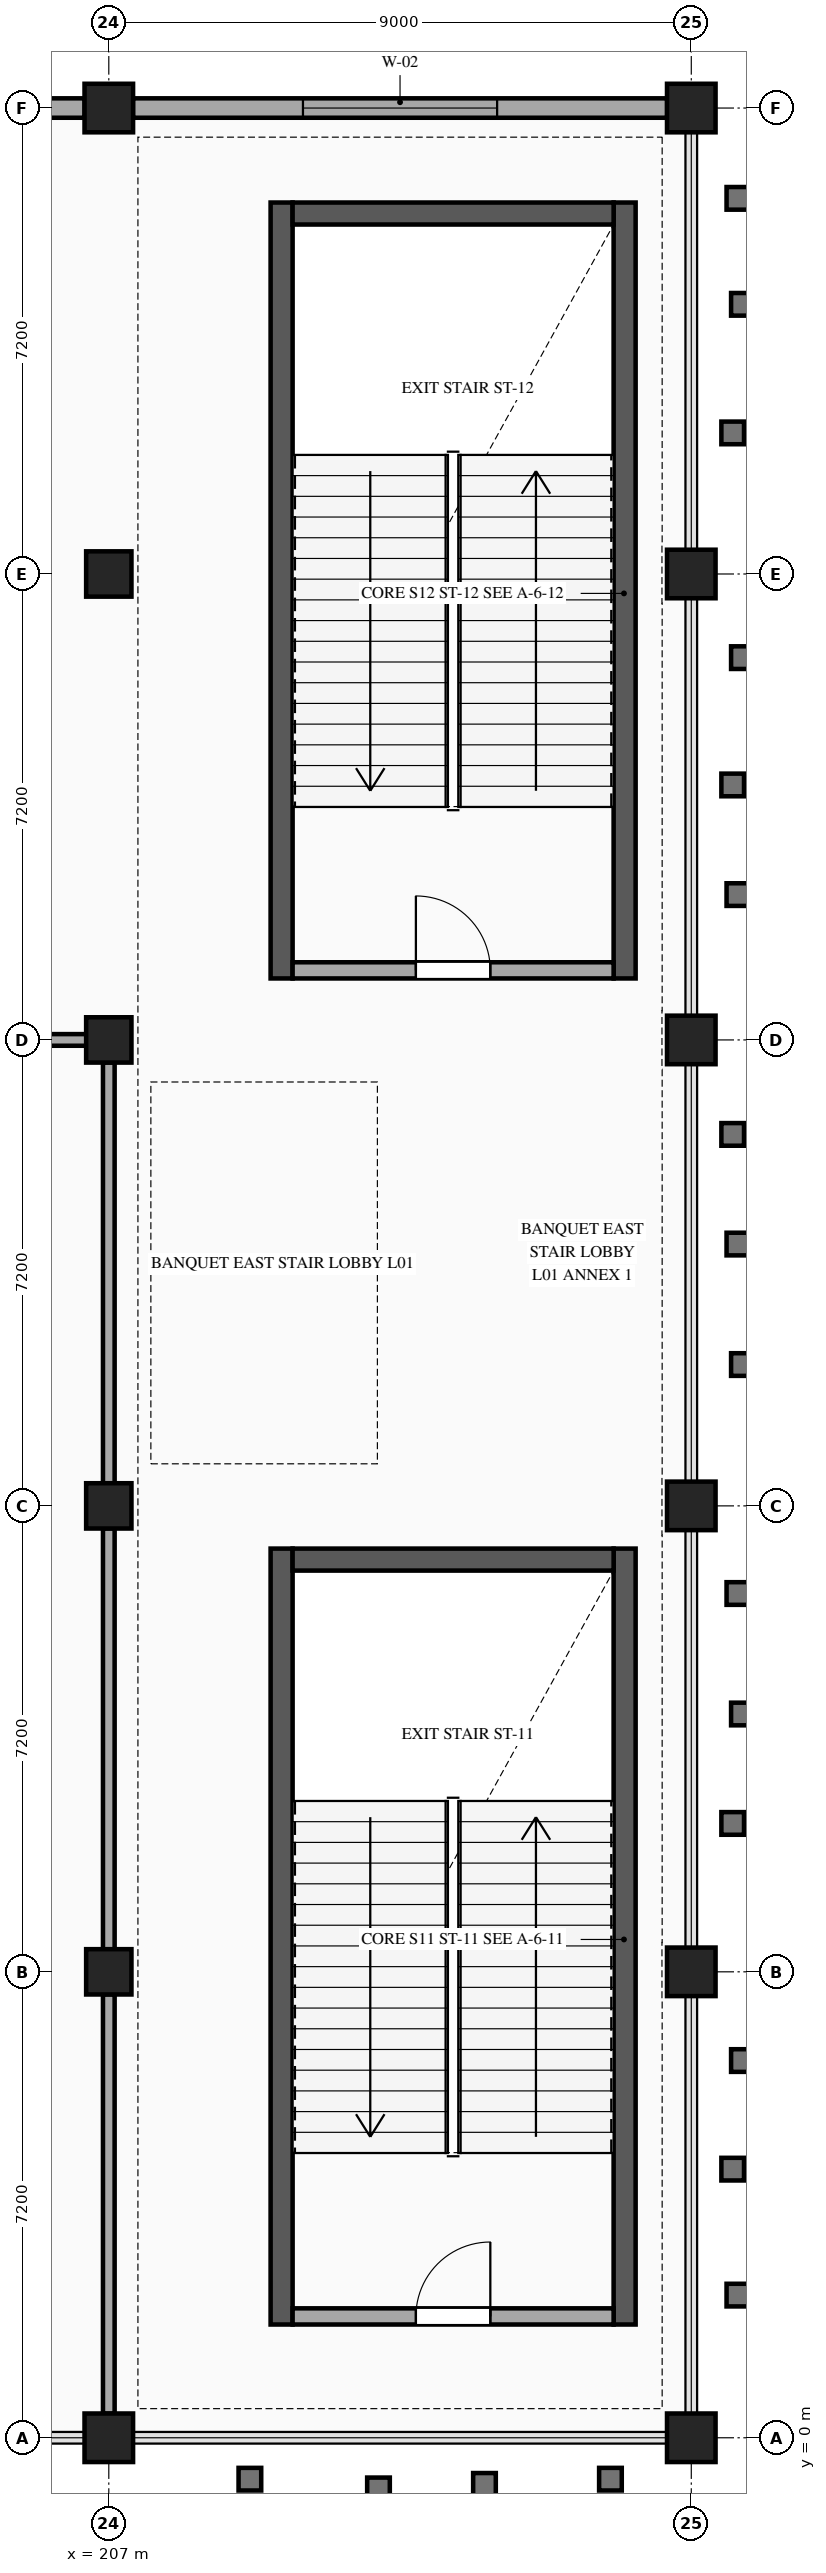
"""IFC4 building model, lengths in metres.
Left out: names, types, materials, properties, quantities, classifications, styles, units other than length and angle.
Written with IfcOpenShell. Run it as: python <this file> out.ifc"""

import sys

from ifc_helpers import new_model, si_unit, direction, frame, frame_2d, origin, origin_2d, place, context, subcontext, project, spatial, rectangle, extrude, element, fill, save


model = new_model("IFC4")
c1 = context("Model", 3, precision=1e-05, world=origin(), true_north=direction((0.0, 1.0)))
c2 = subcontext(c1, "Body", "Model", "MODEL_VIEW")
j1 = project(units=[si_unit("LENGTHUNIT", "METRE"), si_unit("PLANEANGLEUNIT", "RADIAN")], contexts=[c1])
p1 = place(None, origin())
s1 = spatial("IfcSite", under=j1, at=p1, CompositionType="ELEMENT")
p2 = place(p1, origin())
s2 = spatial("IfcBuilding", under=s1, at=p2, CompositionType="ELEMENT")
p3 = place(p2, frame((0.0, 0.0, 5.4)))
s3 = spatial("IfcBuildingStorey", under=s2, at=p3, CompositionType="ELEMENT", Elevation=5.4)
p4 = place(p3, frame((207.0, 0.0, 0.0), z_axis=(0.0, 0.0, 1.0), x_axis=(1.0, 0.0, 0.0)))
e1 = element("IfcColumn", 1, at=p4, inside=s3, PredefinedType="COLUMN", context=c2, shape_type="SweptSolid", body=[
    extrude(rectangle(XDim=0.75, YDim=0.75, at=origin_2d()), origin(), (0.0, 0.0, 1.0), 5.4),
])
for number, where, z_axis, x_axis in (
    (2, (207.0, 7.2, 0.0), (0.0, 0.0, 1.0), (1.0, 0.0, 0.0)),
    (3, (207.0, 14.4, 0.0), (0.0, 0.0, 1.0), (1.0, 0.0, 0.0)),
    (4, (207.0, 21.6, 0.0), (0.0, 0.0, 1.0), (1.0, 0.0, 0.0)),
    (5, (207.0, 28.8, 0.0), (0.0, 0.0, 1.0), (1.0, 0.0, 0.0)),
):
    element("IfcColumn", number, at=place(p3, frame(where, z_axis=z_axis, x_axis=x_axis)), inside=s3, PredefinedType="COLUMN", context=c2, shape_type="SweptSolid", body=[
        extrude(rectangle(XDim=0.7, YDim=0.7, at=origin_2d()), origin(), (0.0, 0.0, 1.0), 5.4),
    ])
for number, where, z_axis, x_axis in (
    (6, (207.0, 36.0, 0.0), (0.0, 0.0, 1.0), (1.0, 0.0, 0.0)),
    (7, (216.0, 0.0, 0.0), (0.0, 0.0, 1.0), (1.0, 0.0, 0.0)),
    (8, (216.0, 7.2, 0.0), (0.0, 0.0, 1.0), (1.0, 0.0, 0.0)),
    (9, (216.0, 14.4, 0.0), (0.0, 0.0, 1.0), (1.0, 0.0, 0.0)),
    (10, (216.0, 21.6, 0.0), (0.0, 0.0, 1.0), (1.0, 0.0, 0.0)),
    (11, (216.0, 28.8, 0.0), (0.0, 0.0, 1.0), (1.0, 0.0, 0.0)),
    (12, (216.0, 36.0, 0.0), (0.0, 0.0, 1.0), (1.0, 0.0, 0.0)),
):
    element("IfcColumn", number, at=place(p3, frame(where, z_axis=z_axis, x_axis=x_axis)), inside=s3, PredefinedType="COLUMN", context=c2, shape_type="SweptSolid", body=[
        extrude(rectangle(XDim=0.75, YDim=0.75, at=origin_2d()), origin(), (0.0, 0.0, 1.0), 5.4),
    ])
for number, where, z_axis, x_axis in (
    (13, (209.67, 1.75, 0.0), (0.0, 0.0, 1.0), (0.0, 1.0, 0.0)),
    (14, (214.97, 13.74, 0.0), (0.0, 0.0, 1.0), (0.0, -1.0, 0.0)),
):
    element("IfcWall", number, at=place(p3, frame(where, z_axis=z_axis, x_axis=x_axis)), inside=s3, PredefinedType="SHEAR", context=c2, shape_type="SweptSolid", body=[
        extrude(rectangle(XDim=11.99, YDim=0.34, at=frame_2d((5.995, 0.0))), origin(), (0.0, 0.0, 1.0), 5.12),
    ])
p5 = place(p3, frame((209.84, 13.57, 0.0), z_axis=(0.0, 0.0, 1.0), x_axis=(1.0, 0.0, 0.0)))
e15 = element("IfcWall", 15, at=p5, inside=s3, PredefinedType="SHEAR", context=c2, shape_type="SweptSolid", body=[
    extrude(rectangle(XDim=4.96, YDim=0.34, at=frame_2d((2.48, 0.0))), origin(), (0.0, 0.0, 1.0), 5.12),
])
for number, where, z_axis, x_axis in (
    (16, (209.67, 22.55, 0.0), (0.0, 0.0, 1.0), (0.0, 1.0, 0.0)),
    (17, (214.97, 34.54, 0.0), (0.0, 0.0, 1.0), (0.0, -1.0, 0.0)),
):
    element("IfcWall", number, at=place(p3, frame(where, z_axis=z_axis, x_axis=x_axis)), inside=s3, PredefinedType="SHEAR", context=c2, shape_type="SweptSolid", body=[
        extrude(rectangle(XDim=11.99, YDim=0.34, at=frame_2d((5.995, 0.0))), origin(), (0.0, 0.0, 1.0), 5.12),
    ])
p6 = place(p3, frame((209.84, 34.37, 0.0), z_axis=(0.0, 0.0, 1.0), x_axis=(1.0, 0.0, 0.0)))
e18 = element("IfcWall", 18, at=p6, inside=s3, PredefinedType="SHEAR", context=c2, shape_type="SweptSolid", body=[
    extrude(rectangle(XDim=4.96, YDim=0.34, at=frame_2d((2.48, 0.0))), origin(), (0.0, 0.0, 1.0), 5.12),
])
p7 = place(p3, frame((198.373, 36.0, 0.0), z_axis=(0.0, 0.0, 1.0), x_axis=(1.0, 0.0, 0.0)))
e19 = element("IfcWall", 19, at=p7, inside=s3, PredefinedType="STANDARD", context=c2, shape_type="SweptSolid", body=[
    extrude(rectangle(XDim=8.254, YDim=0.3, at=frame_2d((4.127, 0.0))), origin(), (0.0, 0.0, 1.0), 4.764),
])
p8 = place(p7, frame((2.327, 0.0, 0.9)))
e20 = element("IfcOpeningElement", 20, at=p8, cuts=e19, PredefinedType="OPENING", context=c2, shape_type="SweptSolid", body=[
    extrude(rectangle(XDim=3.6, YDim=2.1, at=frame_2d((1.8, 1.05))), frame((0.0, 0.16, 0.0), z_axis=(0.0, -1.0, 0.0), x_axis=(1.0, 0.0, 0.0)), (0.0, 0.0, 1.0), 0.32),
])
p9 = place(p3, frame((207.373, 36.0, 0.0), z_axis=(0.0, 0.0, 1.0), x_axis=(1.0, 0.0, 0.0)))
e21 = element("IfcWall", 21, at=p9, inside=s3, PredefinedType="STANDARD", context=c2, shape_type="SweptSolid", body=[
    extrude(rectangle(XDim=8.254, YDim=0.3, at=frame_2d((4.127, 0.0))), origin(), (0.0, 0.0, 1.0), 4.764),
])
p10 = place(p9, frame((2.627, 0.0, 0.9)))
e22 = element("IfcOpeningElement", 22, at=p10, cuts=e21, PredefinedType="OPENING", context=c2, shape_type="SweptSolid", body=[
    extrude(rectangle(XDim=3.0, YDim=2.1, at=frame_2d((1.5, 1.05))), frame((0.0, 0.16, 0.0), z_axis=(0.0, -1.0, 0.0), x_axis=(1.0, 0.0, 0.0)), (0.0, 0.0, 1.0), 0.32),
])
p11 = place(p3, frame((209.84, 1.875, 0.0), z_axis=(0.0, 0.0, 1.0), x_axis=(1.0, 0.0, 0.0)))
e23 = element("IfcWall", 23, at=p11, inside=s3, PredefinedType="STANDARD", context=c2, shape_type="SweptSolid", body=[
    extrude(rectangle(XDim=4.96, YDim=0.25, at=frame_2d((2.48, 0.0))), origin(), (0.0, 0.0, 1.0), 5.12),
])
p12 = place(p11, frame((1.905, 0.0, 0.0)))
e24 = element("IfcOpeningElement", 24, at=p12, cuts=e23, PredefinedType="OPENING", context=c2, shape_type="SweptSolid", body=[
    extrude(rectangle(XDim=1.15, YDim=2.2, at=frame_2d((0.575, 1.1))), frame((0.0, 0.135, 0.0), z_axis=(0.0, -1.0, 0.0), x_axis=(1.0, 0.0, 0.0)), (0.0, 0.0, 1.0), 0.27),
])
p13 = place(p3, frame((209.84, 22.675, 0.0), z_axis=(0.0, 0.0, 1.0), x_axis=(1.0, 0.0, 0.0)))
e25 = element("IfcWall", 25, at=p13, inside=s3, PredefinedType="STANDARD", context=c2, shape_type="SweptSolid", body=[
    extrude(rectangle(XDim=4.96, YDim=0.25, at=frame_2d((2.48, 0.0))), origin(), (0.0, 0.0, 1.0), 5.12),
])
p14 = place(p13, frame((1.905, 0.0, 0.0)))
e26 = element("IfcOpeningElement", 26, at=p14, cuts=e25, PredefinedType="OPENING", context=c2, shape_type="SweptSolid", body=[
    extrude(rectangle(XDim=1.15, YDim=2.2, at=frame_2d((0.575, 1.1))), frame((0.0, 0.135, 0.0), z_axis=(0.0, -1.0, 0.0), x_axis=(1.0, 0.0, 0.0)), (0.0, 0.0, 1.0), 0.27),
])
p15 = place(p3, frame((198.348, 21.6, 0.0), z_axis=(0.0, 0.0, 1.0), x_axis=(1.0, 0.0, 0.0)))
e27 = element("IfcWall", 27, at=p15, inside=s3, PredefinedType="PARTITIONING", context=c2, shape_type="SweptSolid", body=[
    extrude(rectangle(XDim=8.304, YDim=0.18, at=frame_2d((4.152, 0.0))), origin(), (0.0, 0.0, 1.0), 4.264),
])
p16 = place(p3, frame((207.0, 0.373, 0.0), z_axis=(0.0, 0.0, 1.0), x_axis=(0.0, 1.0, 0.0)))
e28 = element("IfcWall", 28, at=p16, inside=s3, PredefinedType="PARTITIONING", context=c2, shape_type="SweptSolid", body=[
    extrude(rectangle(XDim=6.479, YDim=0.18, at=frame_2d((3.24, 0.0))), origin(), (0.0, 0.0, 1.0), 4.264),
])
for number, where, z_axis, x_axis in (
    (29, (207.0, 7.548, 0.0), (0.0, 0.0, 1.0), (0.0, 1.0, 0.0)),
    (30, (207.0, 14.748, 0.0), (0.0, 0.0, 1.0), (0.0, 1.0, 0.0)),
):
    element("IfcWall", number, at=place(p3, frame(where, z_axis=z_axis, x_axis=x_axis)), inside=s3, PredefinedType="PARTITIONING", context=c2, shape_type="SweptSolid", body=[
        extrude(rectangle(XDim=6.504, YDim=0.18, at=frame_2d((3.252, 0.0))), origin(), (0.0, 0.0, 1.0), 4.264),
    ])
p17 = place(p10, origin())
e31 = element("IfcWindow", 31, at=p17, inside=s3, PartitioningType="SINGLE_PANEL", PredefinedType="WINDOW", context=c2, shape_type="SweptSolid", body=[
    extrude(rectangle(XDim=3.0, YDim=2.1, at=frame_2d((1.5, 1.05))), frame((0.0, 0.03, 0.0), z_axis=(0.0, -1.0, 0.0), x_axis=(1.0, 0.0, 0.0)), (0.0, 0.0, 1.0), 0.06),
])
fill(e22, e31)
p18 = place(p12, origin())
e32 = element("IfcDoor", 32, at=p18, inside=s3, OperationType="SINGLE_SWING_RIGHT", PredefinedType="DOOR", context=c2, shape_type="SweptSolid", body=[
    extrude(rectangle(XDim=1.15, YDim=2.2, at=frame_2d((0.575, 1.1))), frame((0.0, 0.025, 0.0), z_axis=(0.0, -1.0, 0.0), x_axis=(1.0, 0.0, 0.0)), (0.0, 0.0, 1.0), 0.05),
])
fill(e24, e32)
p19 = place(p14, origin())
e33 = element("IfcDoor", 33, at=p19, inside=s3, OperationType="SINGLE_SWING_LEFT", PredefinedType="DOOR", context=c2, shape_type="SweptSolid", body=[
    extrude(rectangle(XDim=1.15, YDim=2.2, at=frame_2d((0.575, 1.1))), frame((0.0, 0.025, 0.0), z_axis=(0.0, -1.0, 0.0), x_axis=(1.0, 0.0, 0.0)), (0.0, 0.0, 1.0), 0.05),
])
fill(e26, e33)
save(model, sys.argv[1])
